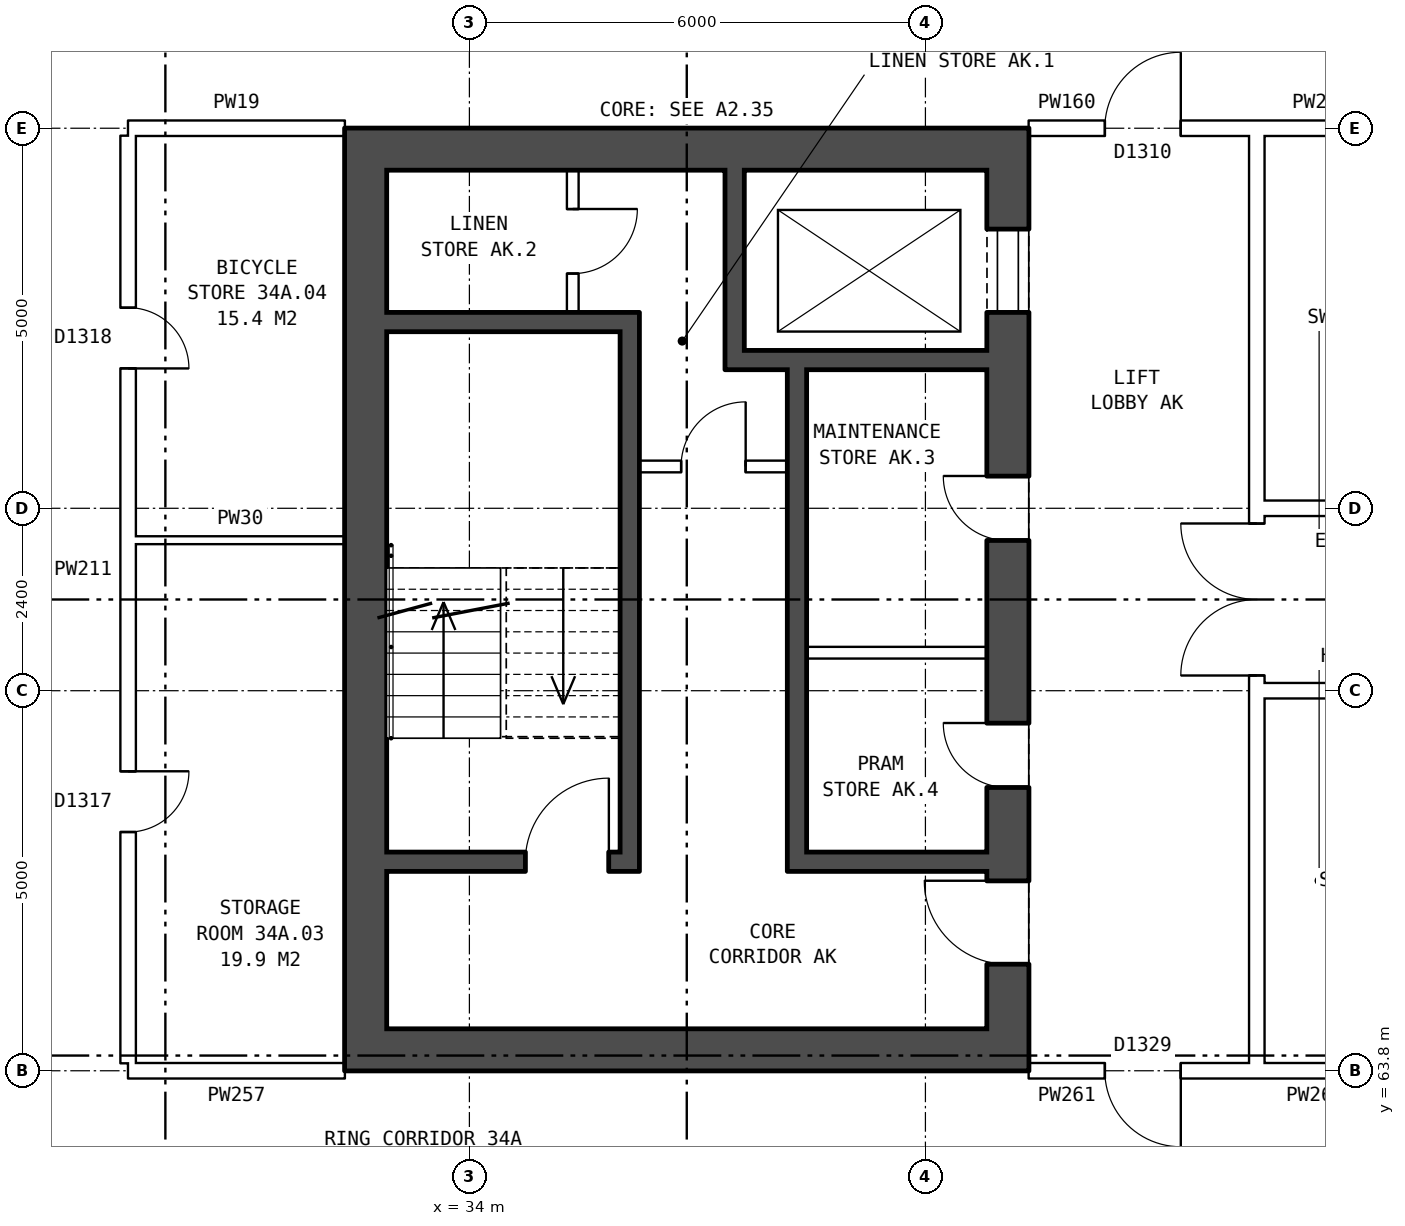
"""IFC4 building model, lengths in metres.
Left out: names, types, materials, properties, quantities, classifications, styles, units other than length and angle.
Written with IfcOpenShell. Run it as: python <this file> out.ifc"""

import sys

from ifc_helpers import new_model, si_unit, direction, frame, frame_2d, origin, place, context, subcontext, project, spatial, rectangle, extrude, element, fill, save


model = new_model("IFC4")
c1 = context("Model", 3, precision=1e-05, world=origin(), true_north=direction((0.0, 1.0)))
c2 = subcontext(c1, "Body", "Model", "MODEL_VIEW")
j1 = project(units=[si_unit("LENGTHUNIT", "METRE"), si_unit("PLANEANGLEUNIT", "RADIAN")], contexts=[c1])
p1 = place(None, origin())
s1 = spatial("IfcSite", under=j1, at=p1, CompositionType="ELEMENT")
p2 = place(p1, origin())
s2 = spatial("IfcBuilding", under=s1, at=p2, CompositionType="ELEMENT")
p3 = place(p2, frame((0.0, 0.0, 123.7)))
s3 = spatial("IfcBuildingStorey", under=s2, at=p3, CompositionType="ELEMENT", Elevation=123.7)
p4 = place(p3, frame((41.085, 76.2, 0.0), z_axis=(0.0, 0.0, 1.0), x_axis=(0.0, -1.0, 0.0)))
e1 = element("IfcWall", 1, at=p4, inside=s3, PredefinedType="SHEAR", context=c2, shape_type="SweptSolid", body=[
    extrude(rectangle(XDim=12.4, YDim=0.55, at=frame_2d((6.2, 0.0))), origin(), (0.0, 0.0, 1.0), 2.85),
])
p5 = place(p4, frame((1.325, 0.0, 0.0)))
e2 = element("IfcOpeningElement", 2, at=p5, cuts=e1, PredefinedType="OPENING", context=c2, shape_type="SweptSolid", body=[
    extrude(rectangle(XDim=1.1, YDim=2.1, at=frame_2d((0.55, 1.05))), frame((0.0, 0.285, 0.0), z_axis=(0.0, -1.0, 0.0), x_axis=(1.0, 0.0, 0.0)), (0.0, 0.0, 1.0), 0.57),
])
p6 = place(p4, frame((4.575, 0.0, 0.0)))
e3 = element("IfcOpeningElement", 3, at=p6, cuts=e1, PredefinedType="OPENING", context=c2, shape_type="SweptSolid", body=[
    extrude(rectangle(XDim=0.85, YDim=2.1, at=frame_2d((0.425, 1.05))), frame((0.0, 0.285, 0.0), z_axis=(0.0, -1.0, 0.0), x_axis=(1.0, 0.0, 0.0)), (0.0, 0.0, 1.0), 0.57),
])
p7 = place(p4, frame((7.825, 0.0, 0.0)))
e4 = element("IfcOpeningElement", 4, at=p7, cuts=e1, PredefinedType="OPENING", context=c2, shape_type="SweptSolid", body=[
    extrude(rectangle(XDim=0.85, YDim=2.1, at=frame_2d((0.425, 1.05))), frame((0.0, 0.285, 0.0), z_axis=(0.0, -1.0, 0.0), x_axis=(1.0, 0.0, 0.0)), (0.0, 0.0, 1.0), 0.57),
])
p8 = place(p4, frame((9.9, 0.0, 0.0)))
e5 = element("IfcOpeningElement", 5, at=p8, cuts=e1, PredefinedType="OPENING", context=c2, shape_type="SweptSolid", body=[
    extrude(rectangle(XDim=1.1, YDim=2.1, at=frame_2d((0.55, 1.05))), frame((0.0, 0.285, 0.0), z_axis=(0.0, -1.0, 0.0), x_axis=(1.0, 0.0, 0.0)), (0.0, 0.0, 1.0), 0.57),
])
p9 = place(p3, frame((32.635, 76.2, 0.0), z_axis=(0.0, 0.0, 1.0), x_axis=(0.0, -1.0, 0.0)))
e6 = element("IfcWall", 6, at=p9, inside=s3, PredefinedType="SHEAR", context=c2, shape_type="SweptSolid", body=[
    extrude(rectangle(XDim=12.4, YDim=0.55, at=frame_2d((6.2, 0.0))), origin(), (0.0, 0.0, 1.0), 2.85),
])
for number, where, z_axis, x_axis in (
    (7, (40.81, 75.925, 0.0), (0.0, 0.0, 1.0), (-1.0, 0.0, 0.0)),
    (8, (40.81, 64.075, 0.0), (0.0, 0.0, 1.0), (-1.0, 0.0, 0.0)),
):
    element("IfcWall", number, at=place(p3, frame(where, z_axis=z_axis, x_axis=x_axis)), inside=s3, PredefinedType="SHEAR", context=c2, shape_type="SweptSolid", body=[
        extrude(rectangle(XDim=7.9, YDim=0.55, at=frame_2d((3.95, 0.0))), origin(), (0.0, 0.0, 1.0), 2.85),
    ])
p10 = place(p3, frame((35.985, 73.65, 0.0), z_axis=(0.0, 0.0, 1.0), x_axis=(-1.0, 0.0, 0.0)))
e9 = element("IfcWall", 9, at=p10, inside=s3, PredefinedType="SHEAR", context=c2, shape_type="SweptSolid", body=[
    extrude(rectangle(XDim=3.075, YDim=0.25, at=frame_2d((1.538, 0.0))), origin(), (0.0, 0.0, 1.0), 2.85),
])
p11 = place(p3, frame((40.81, 73.15, 0.0), z_axis=(0.0, 0.0, 1.0), x_axis=(-1.0, 0.0, 0.0)))
e10 = element("IfcWall", 10, at=p11, inside=s3, PredefinedType="SHEAR", context=c2, shape_type="SweptSolid", body=[
    extrude(rectangle(XDim=3.445, YDim=0.25, at=frame_2d((1.723, 0.0))), origin(), (0.0, 0.0, 1.0), 2.85),
])
p12 = place(p3, frame((38.185, 71.75, 0.0), z_axis=(0.0, 0.0, 1.0), x_axis=(-1.0, 0.0, 0.0)))
e11 = element("IfcWall", 11, at=p12, inside=s3, PredefinedType="PARTITIONING", context=c2, shape_type="SweptSolid", body=[
    extrude(rectangle(XDim=1.95, YDim=0.15, at=frame_2d((0.975, 0.0))), origin(), (0.0, 0.0, 1.0), 2.85),
])
p13 = place(p12, frame((0.55, 0.0, 0.0)))
e12 = element("IfcOpeningElement", 12, at=p13, cuts=e11, PredefinedType="OPENING", context=c2, shape_type="SweptSolid", body=[
    extrude(rectangle(XDim=0.85, YDim=2.1, at=frame_2d((0.425, 1.05))), frame((0.0, 0.085, 0.0), z_axis=(0.0, -1.0, 0.0), x_axis=(1.0, 0.0, 0.0)), (0.0, 0.0, 1.0), 0.17),
])
p14 = place(p3, frame((40.81, 69.3, 0.0), z_axis=(0.0, 0.0, 1.0), x_axis=(-1.0, 0.0, 0.0)))
e13 = element("IfcWall", 13, at=p14, inside=s3, PredefinedType="PARTITIONING", context=c2, shape_type="SweptSolid", body=[
    extrude(rectangle(XDim=2.375, YDim=0.15, at=frame_2d((1.188, 0.0))), origin(), (0.0, 0.0, 1.0), 2.85),
])
p15 = place(p3, frame((40.81, 66.55, 0.0), z_axis=(0.0, 0.0, 1.0), x_axis=(-1.0, 0.0, 0.0)))
e14 = element("IfcWall", 14, at=p15, inside=s3, PredefinedType="SHEAR", context=c2, shape_type="SweptSolid", body=[
    extrude(rectangle(XDim=2.375, YDim=0.25, at=frame_2d((1.188, 0.0))), origin(), (0.0, 0.0, 1.0), 2.85),
])
p16 = place(p3, frame((35.985, 66.55, 0.0), z_axis=(0.0, 0.0, 1.0), x_axis=(-1.0, 0.0, 0.0)))
e15 = element("IfcWall", 15, at=p16, inside=s3, PredefinedType="SHEAR", context=c2, shape_type="SweptSolid", body=[
    extrude(rectangle(XDim=3.075, YDim=0.25, at=frame_2d((1.538, 0.0))), origin(), (0.0, 0.0, 1.0), 2.85),
])
p17 = place(p16, frame((0.15, 0.0, 0.0)))
e16 = element("IfcOpeningElement", 16, at=p17, cuts=e15, PredefinedType="OPENING", context=c2, shape_type="SweptSolid", body=[
    extrude(rectangle(XDim=1.1, YDim=2.1, at=frame_2d((0.55, 1.05))), frame((0.0, 0.135, 0.0), z_axis=(0.0, -1.0, 0.0), x_axis=(1.0, 0.0, 0.0)), (0.0, 0.0, 1.0), 0.27),
])
p18 = place(p3, frame((38.31, 73.025, 0.0), z_axis=(0.0, 0.0, 1.0), x_axis=(0.0, -1.0, 0.0)))
e17 = element("IfcWall", 17, at=p18, inside=s3, PredefinedType="SHEAR", context=c2, shape_type="SweptSolid", body=[
    extrude(rectangle(XDim=6.6, YDim=0.25, at=frame_2d((3.3, 0.0))), origin(), (0.0, 0.0, 1.0), 2.85),
])
p19 = place(p3, frame((37.49, 75.65, 0.0), z_axis=(0.0, 0.0, 1.0), x_axis=(0.0, -1.0, 0.0)))
e18 = element("IfcWall", 18, at=p19, inside=s3, PredefinedType="SHEAR", context=c2, shape_type="SweptSolid", body=[
    extrude(rectangle(XDim=2.375, YDim=0.25, at=frame_2d((1.188, 0.0))), origin(), (0.0, 0.0, 1.0), 2.85),
])
p20 = place(p3, frame((36.11, 73.775, 0.0), z_axis=(0.0, 0.0, 1.0), x_axis=(0.0, -1.0, 0.0)))
e19 = element("IfcWall", 19, at=p20, inside=s3, PredefinedType="SHEAR", context=c2, shape_type="SweptSolid", body=[
    extrude(rectangle(XDim=7.35, YDim=0.25, at=frame_2d((3.675, 0.0))), origin(), (0.0, 0.0, 1.0), 2.85),
])
p21 = place(p3, frame((35.36, 75.65, 0.0), z_axis=(0.0, 0.0, 1.0), x_axis=(0.0, -1.0, 0.0)))
e20 = element("IfcWall", 20, at=p21, inside=s3, PredefinedType="PARTITIONING", context=c2, shape_type="SweptSolid", body=[
    extrude(rectangle(XDim=1.875, YDim=0.15, at=frame_2d((0.938, 0.0))), origin(), (0.0, 0.0, 1.0), 2.85),
])
p22 = place(p21, frame((0.512, 0.0, 0.0)))
e21 = element("IfcOpeningElement", 21, at=p22, cuts=e20, PredefinedType="OPENING", context=c2, shape_type="SweptSolid", body=[
    extrude(rectangle(XDim=0.85, YDim=2.1, at=frame_2d((0.425, 1.05))), frame((0.0, 0.085, 0.0), z_axis=(0.0, -1.0, 0.0), x_axis=(1.0, 0.0, 0.0)), (0.0, 0.0, 1.0), 0.17),
])
p23 = place(p3, frame((44.36, 63.9, 0.0), z_axis=(0.0, 0.0, 1.0), x_axis=(0.0, 1.0, 0.0)))
e22 = element("IfcWall", 22, at=p23, inside=s3, PredefinedType="PARTITIONING", context=c2, shape_type="SweptSolid", body=[
    extrude(rectangle(XDim=12.2, YDim=0.2, at=frame_2d((6.1, 0.0))), origin(), (0.0, 0.0, 1.0), 2.85),
])
p24 = place(p23, frame((5.1, 0.0, 0.0)))
e23 = element("IfcOpeningElement", 23, at=p24, cuts=e22, PredefinedType="OPENING", context=c2, shape_type="SweptSolid", body=[
    extrude(rectangle(XDim=2.0, YDim=2.1, at=frame_2d((1.0, 1.05))), frame((0.0, 0.11, 0.0), z_axis=(0.0, -1.0, 0.0), x_axis=(1.0, 0.0, 0.0)), (0.0, 0.0, 1.0), 0.22),
])
p25 = place(p3, frame((29.51, 63.8, 0.0), z_axis=(0.0, 0.0, 1.0), x_axis=(1.0, 0.0, 0.0)))
e24 = element("IfcWall", 24, at=p25, inside=s3, PredefinedType="PARTITIONING", context=c2, shape_type="SweptSolid", body=[
    extrude(rectangle(XDim=2.85, YDim=0.2, at=frame_2d((1.425, 0.0))), origin(), (0.0, 0.0, 1.0), 2.85),
])
p26 = place(p3, frame((41.36, 63.8, 0.0), z_axis=(0.0, 0.0, 1.0), x_axis=(1.0, 0.0, 0.0)))
e25 = element("IfcWall", 25, at=p26, inside=s3, PredefinedType="PARTITIONING", context=c2, shape_type="SweptSolid", body=[
    extrude(rectangle(XDim=3.0, YDim=0.2, at=frame_2d((1.5, 0.0))), origin(), (0.0, 0.0, 1.0), 2.85),
])
p27 = place(p26, frame((1.0, 0.0, 0.0)))
e26 = element("IfcOpeningElement", 26, at=p27, cuts=e25, PredefinedType="OPENING", context=c2, shape_type="SweptSolid", body=[
    extrude(rectangle(XDim=1.0, YDim=2.1, at=frame_2d((0.5, 1.05))), frame((0.0, 0.11, 0.0), z_axis=(0.0, -1.0, 0.0), x_axis=(1.0, 0.0, 0.0)), (0.0, 0.0, 1.0), 0.22),
])
p28 = place(p3, frame((44.36, 63.8, 0.0), z_axis=(0.0, 0.0, 1.0), x_axis=(1.0, 0.0, 0.0)))
e27 = element("IfcWall", 27, at=p28, inside=s3, PredefinedType="PARTITIONING", context=c2, shape_type="SweptSolid", body=[
    extrude(rectangle(XDim=1.54, YDim=0.2, at=frame_2d((0.77, 0.0))), origin(), (0.0, 0.0, 1.0), 2.85),
])
p29 = place(p3, frame((44.36, 68.8, 0.0), z_axis=(0.0, 0.0, 1.0), x_axis=(1.0, 0.0, 0.0)))
e28 = element("IfcWall", 28, at=p29, inside=s3, PredefinedType="PARTITIONING", context=c2, shape_type="SweptSolid", body=[
    extrude(rectangle(XDim=19.28, YDim=0.2, at=frame_2d((9.64, 0.0))), origin(), (0.0, 0.0, 1.0), 2.85),
])
p30 = place(p29, frame((14.64, 0.0, 0.0)))
e29 = element("IfcOpeningElement", 29, at=p30, cuts=e28, PredefinedType="OPENING", context=c2, shape_type="SweptSolid", body=[
    extrude(rectangle(XDim=1.0, YDim=2.1, at=frame_2d((0.5, 1.05))), frame((0.0, 0.11, 0.0), z_axis=(0.0, -1.0, 0.0), x_axis=(1.0, 0.0, 0.0)), (0.0, 0.0, 1.0), 0.22),
])
p31 = place(p29, frame((5.64, 0.0, 0.0)))
e30 = element("IfcOpeningElement", 30, at=p31, cuts=e28, PredefinedType="OPENING", context=c2, shape_type="SweptSolid", body=[
    extrude(rectangle(XDim=1.0, YDim=2.1, at=frame_2d((0.5, 1.05))), frame((0.0, 0.11, 0.0), z_axis=(0.0, -1.0, 0.0), x_axis=(1.0, 0.0, 0.0)), (0.0, 0.0, 1.0), 0.22),
])
p32 = place(p3, frame((29.61, 70.78, 0.0), z_axis=(0.0, 0.0, 1.0), x_axis=(1.0, 0.0, 0.0)))
e31 = element("IfcWall", 31, at=p32, inside=s3, PredefinedType="PARTITIONING", context=c2, shape_type="SweptSolid", body=[
    extrude(rectangle(XDim=2.75, YDim=0.1, at=frame_2d((1.375, 0.0))), origin(), (0.0, 0.0, 1.0), 2.85),
])
p33 = place(p3, frame((44.36, 71.2, 0.0), z_axis=(0.0, 0.0, 1.0), x_axis=(1.0, 0.0, 0.0)))
e32 = element("IfcWall", 32, at=p33, inside=s3, PredefinedType="PARTITIONING", context=c2, shape_type="SweptSolid", body=[
    extrude(rectangle(XDim=19.28, YDim=0.2, at=frame_2d((9.64, 0.0))), origin(), (0.0, 0.0, 1.0), 2.85),
])
p34 = place(p33, frame((14.64, 0.0, 0.0)))
e33 = element("IfcOpeningElement", 33, at=p34, cuts=e32, PredefinedType="OPENING", context=c2, shape_type="SweptSolid", body=[
    extrude(rectangle(XDim=1.0, YDim=2.1, at=frame_2d((0.5, 1.05))), frame((0.0, 0.11, 0.0), z_axis=(0.0, -1.0, 0.0), x_axis=(1.0, 0.0, 0.0)), (0.0, 0.0, 1.0), 0.22),
])
p35 = place(p33, frame((5.64, 0.0, 0.0)))
e34 = element("IfcOpeningElement", 34, at=p35, cuts=e32, PredefinedType="OPENING", context=c2, shape_type="SweptSolid", body=[
    extrude(rectangle(XDim=1.0, YDim=2.1, at=frame_2d((0.5, 1.05))), frame((0.0, 0.11, 0.0), z_axis=(0.0, -1.0, 0.0), x_axis=(1.0, 0.0, 0.0)), (0.0, 0.0, 1.0), 0.22),
])
p36 = place(p3, frame((29.51, 76.2, 0.0), z_axis=(0.0, 0.0, 1.0), x_axis=(1.0, 0.0, 0.0)))
e35 = element("IfcWall", 35, at=p36, inside=s3, PredefinedType="PARTITIONING", context=c2, shape_type="SweptSolid", body=[
    extrude(rectangle(XDim=2.85, YDim=0.2, at=frame_2d((1.425, 0.0))), origin(), (0.0, 0.0, 1.0), 2.85),
])
p37 = place(p3, frame((41.36, 76.2, 0.0), z_axis=(0.0, 0.0, 1.0), x_axis=(1.0, 0.0, 0.0)))
e36 = element("IfcWall", 36, at=p37, inside=s3, PredefinedType="PARTITIONING", context=c2, shape_type="SweptSolid", body=[
    extrude(rectangle(XDim=3.0, YDim=0.2, at=frame_2d((1.5, 0.0))), origin(), (0.0, 0.0, 1.0), 2.85),
])
p38 = place(p37, frame((1.0, 0.0, 0.0)))
e37 = element("IfcOpeningElement", 37, at=p38, cuts=e36, PredefinedType="OPENING", context=c2, shape_type="SweptSolid", body=[
    extrude(rectangle(XDim=1.0, YDim=2.1, at=frame_2d((0.5, 1.05))), frame((0.0, 0.11, 0.0), z_axis=(0.0, -1.0, 0.0), x_axis=(1.0, 0.0, 0.0)), (0.0, 0.0, 1.0), 0.22),
])
p39 = place(p3, frame((44.36, 76.2, 0.0), z_axis=(0.0, 0.0, 1.0), x_axis=(1.0, 0.0, 0.0)))
e38 = element("IfcWall", 38, at=p39, inside=s3, PredefinedType="PARTITIONING", context=c2, shape_type="SweptSolid", body=[
    extrude(rectangle(XDim=1.54, YDim=0.2, at=frame_2d((0.77, 0.0))), origin(), (0.0, 0.0, 1.0), 2.85),
])
p40 = place(p3, frame((29.51, 63.9, 0.0), z_axis=(0.0, 0.0, 1.0), x_axis=(0.0, 1.0, 0.0)))
e39 = element("IfcWall", 39, at=p40, inside=s3, PredefinedType="PARTITIONING", context=c2, shape_type="SweptSolid", body=[
    extrude(rectangle(XDim=12.2, YDim=0.2, at=frame_2d((6.1, 0.0))), origin(), (0.0, 0.0, 1.0), 2.85),
])
p41 = place(p40, frame((3.04, 0.0, 0.0)))
e40 = element("IfcOpeningElement", 40, at=p41, cuts=e39, PredefinedType="OPENING", context=c2, shape_type="SweptSolid", body=[
    extrude(rectangle(XDim=0.8, YDim=2.1, at=frame_2d((0.4, 1.05))), frame((0.0, 0.11, 0.0), z_axis=(0.0, -1.0, 0.0), x_axis=(1.0, 0.0, 0.0)), (0.0, 0.0, 1.0), 0.22),
])
p42 = place(p40, frame((9.14, 0.0, 0.0)))
e41 = element("IfcOpeningElement", 41, at=p42, cuts=e39, PredefinedType="OPENING", context=c2, shape_type="SweptSolid", body=[
    extrude(rectangle(XDim=0.8, YDim=2.1, at=frame_2d((0.4, 1.05))), frame((0.0, 0.11, 0.0), z_axis=(0.0, -1.0, 0.0), x_axis=(1.0, 0.0, 0.0)), (0.0, 0.0, 1.0), 0.22),
])
p43 = place(p5, origin())
e42 = element("IfcDoor", 42, at=p43, inside=s3, OperationType="DOUBLE_DOOR_SLIDING", PredefinedType="DOOR", context=c2, shape_type="SweptSolid", body=[
    extrude(rectangle(XDim=1.1, YDim=2.1, at=frame_2d((0.55, 1.05))), frame((0.0, -0.21, 0.0), z_axis=(0.0, -1.0, 0.0), x_axis=(1.0, 0.0, 0.0)), (0.0, 0.0, 1.0), 0.05),
])
fill(e2, e42)
p44 = place(p6, frame((0.85, 0.0, 0.0), z_axis=(0.0, 0.0, 1.0), x_axis=(-1.0, 0.0, 0.0)))
e43 = element("IfcDoor", 43, at=p44, inside=s3, OperationType="SINGLE_SWING_RIGHT", PredefinedType="DOOR", context=c2, shape_type="SweptSolid", body=[
    extrude(rectangle(XDim=0.85, YDim=2.1, at=frame_2d((0.425, 1.05))), frame((0.0, 0.26, 0.0), z_axis=(0.0, -1.0, 0.0), x_axis=(1.0, 0.0, 0.0)), (0.0, 0.0, 1.0), 0.05),
])
fill(e3, e43)
p45 = place(p7, frame((0.85, 0.0, 0.0), z_axis=(0.0, 0.0, 1.0), x_axis=(-1.0, 0.0, 0.0)))
e44 = element("IfcDoor", 44, at=p45, inside=s3, OperationType="SINGLE_SWING_RIGHT", PredefinedType="DOOR", context=c2, shape_type="SweptSolid", body=[
    extrude(rectangle(XDim=0.85, YDim=2.1, at=frame_2d((0.425, 1.05))), frame((0.0, 0.26, 0.0), z_axis=(0.0, -1.0, 0.0), x_axis=(1.0, 0.0, 0.0)), (0.0, 0.0, 1.0), 0.05),
])
fill(e4, e44)
p46 = place(p8, frame((1.1, 0.0, 0.0), z_axis=(0.0, 0.0, 1.0), x_axis=(-1.0, 0.0, 0.0)))
e45 = element("IfcDoor", 45, at=p46, inside=s3, OperationType="SINGLE_SWING_RIGHT", PredefinedType="DOOR", context=c2, shape_type="SweptSolid", body=[
    extrude(rectangle(XDim=1.1, YDim=2.1, at=frame_2d((0.55, 1.05))), frame((0.0, 0.26, 0.0), z_axis=(0.0, -1.0, 0.0), x_axis=(1.0, 0.0, 0.0)), (0.0, 0.0, 1.0), 0.05),
])
fill(e5, e45)
p47 = place(p17, frame((1.1, 0.0, 0.0), z_axis=(0.0, 0.0, 1.0), x_axis=(-1.0, 0.0, 0.0)))
e46 = element("IfcDoor", 46, at=p47, inside=s3, OperationType="SINGLE_SWING_RIGHT", PredefinedType="DOOR", context=c2, shape_type="SweptSolid", body=[
    extrude(rectangle(XDim=1.1, YDim=2.1, at=frame_2d((0.55, 1.05))), frame((0.0, 0.025, 0.0), z_axis=(0.0, -1.0, 0.0), x_axis=(1.0, 0.0, 0.0)), (0.0, 0.0, 1.0), 0.05),
])
fill(e16, e46)
p48 = place(p13, frame((0.85, 0.0, 0.0), z_axis=(0.0, 0.0, 1.0), x_axis=(-1.0, 0.0, 0.0)))
e47 = element("IfcDoor", 47, at=p48, inside=s3, OperationType="SINGLE_SWING_RIGHT", PredefinedType="DOOR", context=c2, shape_type="SweptSolid", body=[
    extrude(rectangle(XDim=0.85, YDim=2.1, at=frame_2d((0.425, 1.05))), frame((0.0, 0.025, 0.0), z_axis=(0.0, -1.0, 0.0), x_axis=(1.0, 0.0, 0.0)), (0.0, 0.0, 1.0), 0.05),
])
fill(e12, e47)
p49 = place(p22, origin())
e48 = element("IfcDoor", 48, at=p49, inside=s3, OperationType="SINGLE_SWING_LEFT", PredefinedType="DOOR", context=c2, shape_type="SweptSolid", body=[
    extrude(rectangle(XDim=0.85, YDim=2.1, at=frame_2d((0.425, 1.05))), frame((0.0, 0.025, 0.0), z_axis=(0.0, -1.0, 0.0), x_axis=(1.0, 0.0, 0.0)), (0.0, 0.0, 1.0), 0.05),
])
fill(e21, e48)
p50 = place(p24, origin())
e49 = element("IfcDoor", 49, at=p50, inside=s3, OperationType="DOUBLE_DOOR_SINGLE_SWING", PredefinedType="DOOR", context=c2, shape_type="SweptSolid", body=[
    extrude(rectangle(XDim=2.0, YDim=2.1, at=frame_2d((1.0, 1.05))), frame((0.0, 0.025, 0.0), z_axis=(0.0, -1.0, 0.0), x_axis=(1.0, 0.0, 0.0)), (0.0, 0.0, 1.0), 0.05),
])
fill(e23, e49)
p51 = place(p27, frame((1.0, 0.0, 0.0), z_axis=(0.0, 0.0, 1.0), x_axis=(-1.0, 0.0, 0.0)))
e50 = element("IfcDoor", 50, at=p51, inside=s3, OperationType="SINGLE_SWING_LEFT", PredefinedType="DOOR", context=c2, shape_type="SweptSolid", body=[
    extrude(rectangle(XDim=1.0, YDim=2.1, at=frame_2d((0.5, 1.05))), frame((0.0, 0.025, 0.0), z_axis=(0.0, -1.0, 0.0), x_axis=(1.0, 0.0, 0.0)), (0.0, 0.0, 1.0), 0.05),
])
fill(e26, e50)
p52 = place(p38, origin())
e51 = element("IfcDoor", 51, at=p52, inside=s3, OperationType="SINGLE_SWING_RIGHT", PredefinedType="DOOR", context=c2, shape_type="SweptSolid", body=[
    extrude(rectangle(XDim=1.0, YDim=2.1, at=frame_2d((0.5, 1.05))), frame((0.0, 0.025, 0.0), z_axis=(0.0, -1.0, 0.0), x_axis=(1.0, 0.0, 0.0)), (0.0, 0.0, 1.0), 0.05),
])
fill(e37, e51)
p53 = place(p41, frame((0.8, 0.0, 0.0), z_axis=(0.0, 0.0, 1.0), x_axis=(-1.0, 0.0, 0.0)))
e52 = element("IfcDoor", 52, at=p53, inside=s3, OperationType="SINGLE_SWING_LEFT", PredefinedType="DOOR", context=c2, shape_type="SweptSolid", body=[
    extrude(rectangle(XDim=0.8, YDim=2.1, at=frame_2d((0.4, 1.05))), frame((0.0, 0.025, 0.0), z_axis=(0.0, -1.0, 0.0), x_axis=(1.0, 0.0, 0.0)), (0.0, 0.0, 1.0), 0.05),
])
fill(e40, e52)
p54 = place(p42, frame((0.8, 0.0, 0.0), z_axis=(0.0, 0.0, 1.0), x_axis=(-1.0, 0.0, 0.0)))
e53 = element("IfcDoor", 53, at=p54, inside=s3, OperationType="SINGLE_SWING_RIGHT", PredefinedType="DOOR", context=c2, shape_type="SweptSolid", body=[
    extrude(rectangle(XDim=0.8, YDim=2.1, at=frame_2d((0.4, 1.05))), frame((0.0, 0.025, 0.0), z_axis=(0.0, -1.0, 0.0), x_axis=(1.0, 0.0, 0.0)), (0.0, 0.0, 1.0), 0.05),
])
fill(e41, e53)
save(model, sys.argv[1])
